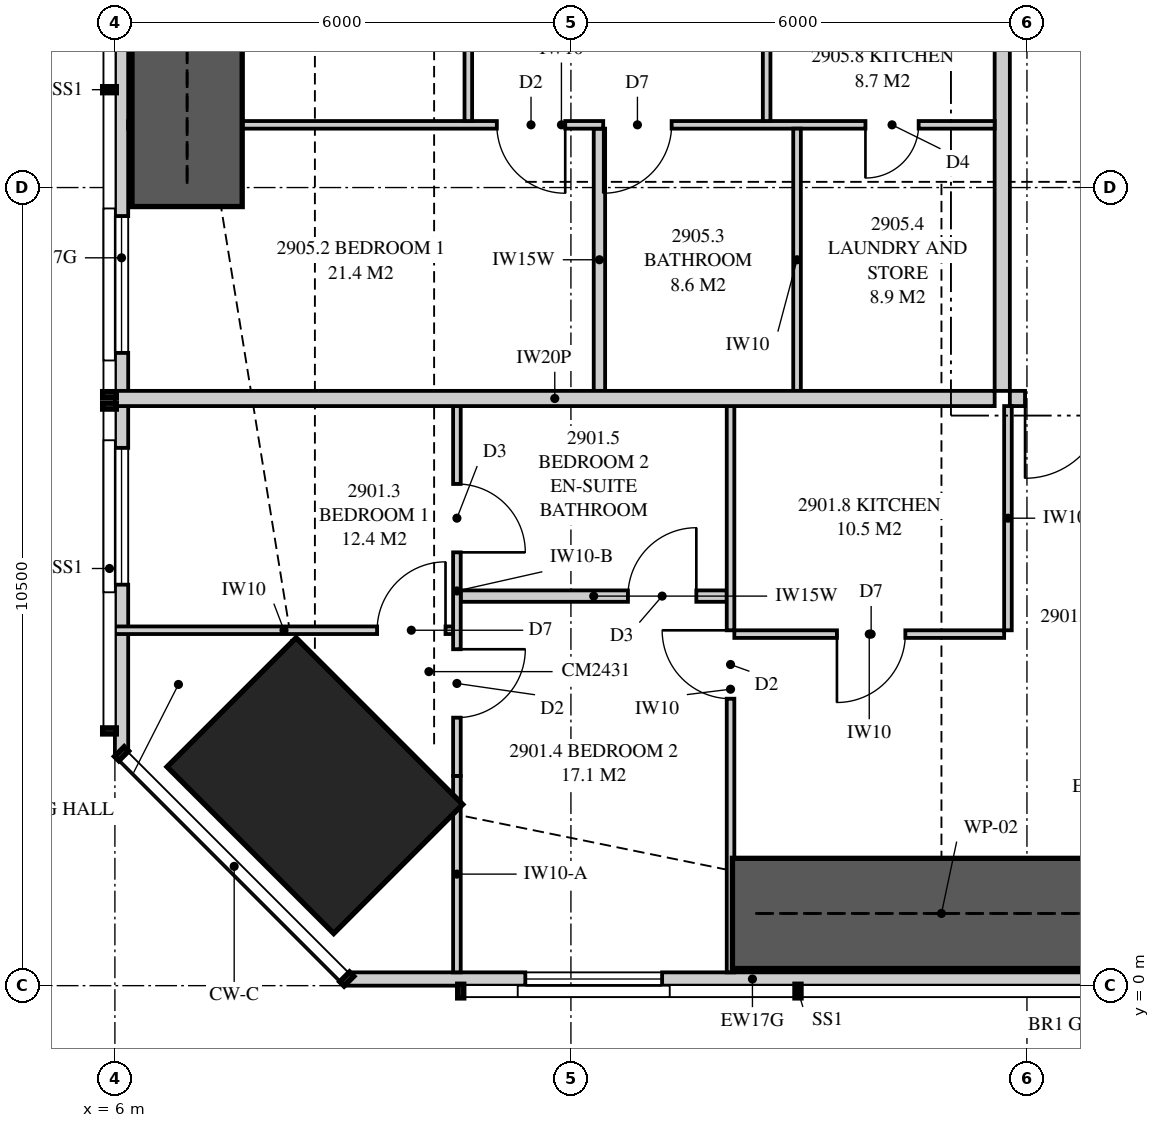
"""IFC4 building model, lengths in metres.
Left out: names, types, materials, properties, quantities, classifications, styles, units other than length and angle.
Written with IfcOpenShell. Run it as: python <this file> out.ifc"""

import sys

from ifc_helpers import new_model, si_unit, direction, frame, frame_2d, origin, origin_2d, place, context, subcontext, project, spatial, polyline, rectangle, outline, extrude, element, fill, save


model = new_model("IFC4")
c1 = context("Model", 3, precision=1e-05, world=origin(), true_north=direction((0.0, 1.0)))
c2 = subcontext(c1, "Body", "Model", "MODEL_VIEW")
j1 = project(units=[si_unit("LENGTHUNIT", "METRE"), si_unit("PLANEANGLEUNIT", "RADIAN")], contexts=[c1])
p1 = place(None, origin())
s1 = spatial("IfcSite", under=j1, at=p1, CompositionType="ELEMENT")
p2 = place(p1, origin())
s2 = spatial("IfcBuilding", under=s1, at=p2, CompositionType="ELEMENT")
p3 = place(p2, frame((0.0, 0.0, 108.2)))
s3 = spatial("IfcBuildingStorey", under=s2, at=p3, CompositionType="ELEMENT", Elevation=108.2)
p4 = place(p3, frame((8.631, 2.631, 0.0), z_axis=(0.0, 0.0, 1.0), x_axis=(0.707106781187, 0.707106781187, 0.0)))
e1 = element("IfcColumn", 1, at=p4, inside=s3, PredefinedType="COLUMN", context=c2, shape_type="SweptSolid", body=[
    extrude(rectangle(XDim=2.4, YDim=3.1, at=origin_2d()), origin(), (0.0, 0.0, 1.0), 3.35),
])
p5 = place(p3, frame((9.051, 0.087, 0.0), z_axis=(0.0, 0.0, 1.0), x_axis=(1.0, 0.0, 0.0)))
e2 = element("IfcWall", 2, at=p5, inside=s3, PredefinedType="SOLIDWALL", context=c2, shape_type="SweptSolid", body=[
    extrude(outline(polyline([(0.0, 0.0), (10.674, 0.0), (10.674, 2.15), (7.824, 2.15), (7.824, 3.11), (7.666, 3.11), (7.666, 2.15), (7.62, 2.15), (7.62, 3.11), (0.0, 3.11), (0.0, 0.0)])), frame((0.0, 0.087, 0.0), z_axis=(0.0, -1.0, 0.0), x_axis=(1.0, 0.0, 0.0)), (0.0, 0.0, 1.0), 0.175),
])
p6 = place(p5, frame((2.349, 0.0, 0.4)))
e3 = element("IfcOpeningElement", 3, at=p6, cuts=e2, PredefinedType="OPENING", context=c2, shape_type="SweptSolid", body=[
    extrude(rectangle(XDim=1.8, YDim=1.7, at=frame_2d((0.9, 0.85))), frame((0.0, 0.097, 0.0), z_axis=(0.0, -1.0, 0.0), x_axis=(1.0, 0.0, 0.0)), (0.0, 0.0, 1.0), 0.195),
])
p7 = place(p3, frame((6.087, 16.1, 0.0), z_axis=(0.0, 0.0, 1.0), x_axis=(0.0, -1.0, 0.0)))
e4 = element("IfcWall", 4, at=p7, inside=s3, PredefinedType="SOLIDWALL", context=c2, shape_type="SweptSolid", body=[
    extrude(outline(polyline([(0.0, 0.0), (13.049, 0.0), (13.049, 3.11), (3.319, 3.11), (3.319, 2.15), (3.226, 2.15), (3.226, 3.11), (3.1, 3.11), (3.1, 2.15), (0.0, 2.15), (0.0, 0.0)])), frame((0.0, 0.087, 0.0), z_axis=(0.0, -1.0, 0.0), x_axis=(1.0, 0.0, 0.0)), (0.0, 0.0, 1.0), 0.175),
])
p8 = place(p7, frame((5.975, 0.0, 0.4)))
e5 = element("IfcOpeningElement", 5, at=p8, cuts=e4, PredefinedType="OPENING", context=c2, shape_type="SweptSolid", body=[
    extrude(rectangle(XDim=1.8, YDim=1.7, at=frame_2d((0.9, 0.85))), frame((0.0, 0.097, 0.0), z_axis=(0.0, -1.0, 0.0), x_axis=(1.0, 0.0, 0.0)), (0.0, 0.0, 1.0), 0.195),
])
p9 = place(p7, frame((9.025, 0.0, 0.4)))
e6 = element("IfcOpeningElement", 6, at=p9, cuts=e4, PredefinedType="OPENING", context=c2, shape_type="SweptSolid", body=[
    extrude(rectangle(XDim=1.8, YDim=1.7, at=frame_2d((0.9, 0.85))), frame((0.0, 0.097, 0.0), z_axis=(0.0, -1.0, 0.0), x_axis=(1.0, 0.0, 0.0)), (0.0, 0.0, 1.0), 0.195),
])
p10 = place(p3, frame((17.775, 7.725, 0.0), z_axis=(0.0, 0.0, 1.0), x_axis=(1.0, 0.0, 0.0)))
e7 = element("IfcWall", 7, at=p10, inside=s3, PredefinedType="PARTITIONING", context=c2, shape_type="SweptSolid", body=[
    extrude(rectangle(XDim=8.225, YDim=0.2, at=frame_2d((4.113, 0.0))), origin(), (0.0, 0.0, 1.0), 3.11),
])
p11 = place(p10, frame((0.2, 0.0, 0.0)))
e8 = element("IfcOpeningElement", 8, at=p11, cuts=e7, PredefinedType="OPENING", context=c2, shape_type="SweptSolid", body=[
    extrude(rectangle(XDim=1.05, YDim=2.2, at=frame_2d((0.525, 1.1))), frame((0.0, 0.11, 0.0), z_axis=(0.0, -1.0, 0.0), x_axis=(1.0, 0.0, 0.0)), (0.0, 0.0, 1.0), 0.22),
])
p12 = place(p3, frame((10.5, 0.175, 0.0), z_axis=(0.0, 0.0, 1.0), x_axis=(0.0, 1.0, 0.0)))
e9 = element("IfcWall", 9, at=p12, inside=s3, PredefinedType="PARTITIONING", context=c2, shape_type="SweptSolid", body=[
    extrude(outline(polyline([(0.0, 0.0), (2.585, 0.0), (2.585, 2.15), (1.198, 2.15), (1.198, 3.11), (0.0, 3.11), (0.0, 0.0)])), frame((0.0, 0.05, 0.0), z_axis=(0.0, -1.0, 0.0), x_axis=(1.0, 0.0, 0.0)), (0.0, 0.0, 1.0), 0.1),
])
p13 = place(p3, frame((10.5, 2.76, 0.0), z_axis=(0.0, 0.0, 1.0), x_axis=(0.0, 1.0, 0.0)))
e10 = element("IfcWall", 10, at=p13, inside=s3, PredefinedType="PARTITIONING", context=c2, shape_type="SweptSolid", body=[
    extrude(outline(polyline([(0.0, 0.0), (4.865, 0.0), (4.865, 2.51), (0.368, 2.51), (0.368, 2.15), (0.0, 2.15), (0.0, 0.0)])), frame((0.0, 0.05, 0.0), z_axis=(0.0, -1.0, 0.0), x_axis=(1.0, 0.0, 0.0)), (0.0, 0.0, 1.0), 0.1),
])
p14 = place(p13, frame((0.766, 0.0, 0.0)))
e11 = element("IfcOpeningElement", 11, at=p14, cuts=e10, PredefinedType="OPENING", context=c2, shape_type="SweptSolid", body=[
    extrude(rectangle(XDim=0.9, YDim=2.1, at=frame_2d((0.45, 1.05))), frame((0.0, 0.06, 0.0), z_axis=(0.0, -1.0, 0.0), x_axis=(1.0, 0.0, 0.0)), (0.0, 0.0, 1.0), 0.12),
])
p15 = place(p13, frame((2.941, 0.0, 0.0)))
e12 = element("IfcOpeningElement", 12, at=p15, cuts=e10, PredefinedType="OPENING", context=c2, shape_type="SweptSolid", body=[
    extrude(rectangle(XDim=0.9, YDim=2.1, at=frame_2d((0.45, 1.05))), frame((0.0, 0.06, 0.0), z_axis=(0.0, -1.0, 0.0), x_axis=(1.0, 0.0, 0.0)), (0.0, 0.0, 1.0), 0.12),
])
p16 = place(p3, frame((14.1, 0.175, 0.0), z_axis=(0.0, 0.0, 1.0), x_axis=(0.0, 1.0, 0.0)))
e13 = element("IfcWall", 13, at=p16, inside=s3, PredefinedType="PARTITIONING", context=c2, shape_type="SweptSolid", body=[
    extrude(outline(polyline([(0.0, 0.0), (7.45, 0.0), (7.45, 3.11), (2.219, 3.11), (2.219, 2.15), (0.463, 2.15), (0.463, 3.11), (0.0, 3.11), (0.0, 0.0)])), frame((0.0, 0.05, 0.0), z_axis=(0.0, -1.0, 0.0), x_axis=(1.0, 0.0, 0.0)), (0.0, 0.0, 1.0), 0.1),
])
p17 = place(p16, frame((3.6, 0.0, 0.0)))
e14 = element("IfcOpeningElement", 14, at=p17, cuts=e13, PredefinedType="OPENING", context=c2, shape_type="SweptSolid", body=[
    extrude(rectangle(XDim=0.9, YDim=2.1, at=frame_2d((0.45, 1.05))), frame((0.0, 0.06, 0.0), z_axis=(0.0, -1.0, 0.0), x_axis=(1.0, 0.0, 0.0)), (0.0, 0.0, 1.0), 0.12),
])
p18 = place(p3, frame((6.0, 4.676, 0.0), z_axis=(0.0, 0.0, 1.0), x_axis=(1.0, 0.0, 0.0)))
e15 = element("IfcWall", 15, at=p18, inside=s3, PredefinedType="PARTITIONING", context=c2, shape_type="SweptSolid", body=[
    extrude(outline(polyline([(0.0, 0.0), (4.45, 0.0), (4.45, 3.11), (4.45, 2.51), (3.171, 2.51), (3.171, 2.15), (1.429, 2.15), (1.429, 3.11), (0.0, 3.11), (0.0, 0.0)])), frame((0.0, 0.05, 0.0), z_axis=(0.0, -1.0, 0.0), x_axis=(1.0, 0.0, 0.0)), (0.0, 0.0, 1.0), 0.1),
])
p19 = place(p18, frame((3.45, 0.0, 0.0)))
e16 = element("IfcOpeningElement", 16, at=p19, cuts=e15, PredefinedType="OPENING", context=c2, shape_type="SweptSolid", body=[
    extrude(rectangle(XDim=0.9, YDim=2.1, at=frame_2d((0.45, 1.05))), frame((0.0, 0.06, 0.0), z_axis=(0.0, -1.0, 0.0), x_axis=(1.0, 0.0, 0.0)), (0.0, 0.0, 1.0), 0.12),
])
p20 = place(p3, frame((10.55, 5.125, 0.0), z_axis=(0.0, 0.0, 1.0), x_axis=(1.0, 0.0, 0.0)))
e17 = element("IfcWall", 17, at=p20, inside=s3, PredefinedType="PLUMBINGWALL", context=c2, shape_type="SweptSolid", body=[
    extrude(outline(polyline([(0.0, 0.0), (3.5, 0.0), (3.5, 3.11), (0.935, 3.11), (0.935, 2.51), (0.0, 2.51), (0.0, 3.11), (0.0, 0.0)])), frame((0.0, 0.075, 0.0), z_axis=(0.0, -1.0, 0.0), x_axis=(1.0, 0.0, 0.0)), (0.0, 0.0, 1.0), 0.15),
])
p21 = place(p20, frame((2.2, 0.0, 0.0)))
e18 = element("IfcOpeningElement", 18, at=p21, cuts=e17, PredefinedType="OPENING", context=c2, shape_type="SweptSolid", body=[
    extrude(rectangle(XDim=0.9, YDim=2.1, at=frame_2d((0.45, 1.05))), frame((0.0, 0.085, 0.0), z_axis=(0.0, -1.0, 0.0), x_axis=(1.0, 0.0, 0.0)), (0.0, 0.0, 1.0), 0.17),
])
p22 = place(p3, frame((14.15, 4.625, 0.0), z_axis=(0.0, 0.0, 1.0), x_axis=(1.0, 0.0, 0.0)))
e19 = element("IfcWall", 19, at=p22, inside=s3, PredefinedType="PARTITIONING", context=c2, shape_type="SweptSolid", body=[
    extrude(outline(polyline([(0.0, 0.0), (3.55, 0.0), (3.55, 3.11), (3.012, 3.11), (3.012, 2.541), (2.438, 2.541), (2.438, 3.11), (0.0, 3.11), (0.0, 0.0)])), frame((0.0, 0.05, 0.0), z_axis=(0.0, -1.0, 0.0), x_axis=(1.0, 0.0, 0.0)), (0.0, 0.0, 1.0), 0.1),
])
p23 = place(p22, frame((1.35, 0.0, 0.0)))
e20 = element("IfcOpeningElement", 20, at=p23, cuts=e19, PredefinedType="OPENING", context=c2, shape_type="SweptSolid", body=[
    extrude(rectangle(XDim=0.9, YDim=2.1, at=frame_2d((0.45, 1.05))), frame((0.0, 0.06, 0.0), z_axis=(0.0, -1.0, 0.0), x_axis=(1.0, 0.0, 0.0)), (0.0, 0.0, 1.0), 0.12),
])
p24 = place(p3, frame((17.75, 4.675, 0.0), z_axis=(0.0, 0.0, 1.0), x_axis=(0.0, 1.0, 0.0)))
e21 = element("IfcWall", 21, at=p24, inside=s3, PredefinedType="PARTITIONING", context=c2, shape_type="SweptSolid", body=[
    extrude(rectangle(XDim=2.95, YDim=0.1, at=frame_2d((1.475, 0.0))), origin(), (0.0, 0.0, 1.0), 3.11),
])
p25 = place(p3, frame((6.0, 7.725, 0.0), z_axis=(0.0, 0.0, 1.0), x_axis=(1.0, 0.0, 0.0)))
e22 = element("IfcWall", 22, at=p25, inside=s3, PredefinedType="PARTITIONING", context=c2, shape_type="SweptSolid", body=[
    extrude(outline(polyline([(0.0, 0.0), (11.575, 0.0), (11.575, 3.11), (11.212, 3.11), (11.212, 2.541), (10.538, 2.541), (10.538, 3.11), (5.51, 3.11), (5.51, 2.51), (2.969, 2.51), (2.969, 2.541), (2.727, 2.541), (2.727, 2.15), (0.884, 2.15), (0.884, 3.11), (0.0, 3.11), (0.0, 0.0)])), frame((0.0, 0.1, 0.0), z_axis=(0.0, -1.0, 0.0), x_axis=(1.0, 0.0, 0.0)), (0.0, 0.0, 1.0), 0.2),
])
p26 = place(p3, frame((17.675, 7.825, 0.0), z_axis=(0.0, 0.0, 1.0), x_axis=(0.0, 1.0, 0.0)))
e23 = element("IfcWall", 23, at=p26, inside=s3, PredefinedType="PARTITIONING", context=c2, shape_type="SweptSolid", body=[
    extrude(outline(polyline([(0.0, 0.0), (6.637, 0.0), (6.637, 3.11), (3.087, 3.11), (3.087, 2.541), (2.413, 2.541), (2.413, 3.11), (0.0, 3.11), (0.0, 0.0)])), frame((0.0, 0.1, 0.0), z_axis=(0.0, -1.0, 0.0), x_axis=(1.0, 0.0, 0.0)), (0.0, 0.0, 1.0), 0.2),
])
p27 = place(p3, frame((6.175, 11.325, 0.0), z_axis=(0.0, 0.0, 1.0), x_axis=(1.0, 0.0, 0.0)))
e24 = element("IfcWall", 24, at=p27, inside=s3, PredefinedType="PARTITIONING", context=c2, shape_type="SweptSolid", body=[
    extrude(outline(polyline([(0.175, 3.11), (0.0, 3.11), (0.0, 0.0), (0.529, 0.0), (0.529, 0.325), (1.021, 0.325), (1.021, 0.0), (11.4, 0.0), (11.4, 3.11), (5.285, 3.11), (5.285, 2.51), (2.765, 2.51), (2.765, 3.11), (2.744, 3.11), (2.744, 2.541), (2.169, 2.541), (2.169, 3.11), (1.918, 3.11), (1.918, 2.15), (1.021, 2.15), (1.021, 1.825), (0.529, 1.825), (0.529, 2.15), (0.175, 2.15), (0.175, 3.11)])), frame((0.0, 0.05, 0.0), z_axis=(0.0, -1.0, 0.0), x_axis=(1.0, 0.0, 0.0)), (0.0, 0.0, 1.0), 0.1),
])
p28 = place(p27, frame((4.85, 0.0, 0.0)))
e25 = element("IfcOpeningElement", 25, at=p28, cuts=e24, PredefinedType="OPENING", context=c2, shape_type="SweptSolid", body=[
    extrude(rectangle(XDim=0.9, YDim=2.1, at=frame_2d((0.45, 1.05))), frame((0.0, 0.06, 0.0), z_axis=(0.0, -1.0, 0.0), x_axis=(1.0, 0.0, 0.0)), (0.0, 0.0, 1.0), 0.12),
])
p29 = place(p27, frame((6.25, 0.0, 0.0)))
e26 = element("IfcOpeningElement", 26, at=p29, cuts=e24, PredefinedType="OPENING", context=c2, shape_type="SweptSolid", body=[
    extrude(rectangle(XDim=0.9, YDim=2.1, at=frame_2d((0.45, 1.05))), frame((0.0, 0.06, 0.0), z_axis=(0.0, -1.0, 0.0), x_axis=(1.0, 0.0, 0.0)), (0.0, 0.0, 1.0), 0.12),
])
p30 = place(p27, frame((9.7, 0.0, 0.0)))
e27 = element("IfcOpeningElement", 27, at=p30, cuts=e24, PredefinedType="OPENING", context=c2, shape_type="SweptSolid", body=[
    extrude(rectangle(XDim=0.7, YDim=2.1, at=frame_2d((0.35, 1.05))), frame((0.0, 0.06, 0.0), z_axis=(0.0, -1.0, 0.0), x_axis=(1.0, 0.0, 0.0)), (0.0, 0.0, 1.0), 0.12),
])
p31 = place(p3, frame((12.375, 7.825, 0.0), z_axis=(0.0, 0.0, 1.0), x_axis=(0.0, 1.0, 0.0)))
e28 = element("IfcWall", 28, at=p31, inside=s3, PredefinedType="PLUMBINGWALL", context=c2, shape_type="SweptSolid", body=[
    extrude(outline(polyline([(0.0, 0.0), (3.45, 0.0), (3.45, 3.11), (3.062, 3.11), (3.062, 2.541), (2.438, 2.541), (2.438, 3.11), (0.0, 3.11), (0.0, 0.0)])), frame((0.0, 0.075, 0.0), z_axis=(0.0, -1.0, 0.0), x_axis=(1.0, 0.0, 0.0)), (0.0, 0.0, 1.0), 0.15),
])
p32 = place(p3, frame((14.975, 7.825, 0.0), z_axis=(0.0, 0.0, 1.0), x_axis=(0.0, 1.0, 0.0)))
e29 = element("IfcWall", 29, at=p32, inside=s3, PredefinedType="PARTITIONING", context=c2, shape_type="SweptSolid", body=[
    extrude(outline(polyline([(0.0, 0.0), (3.45, 0.0), (3.45, 3.11), (3.037, 3.11), (3.037, 2.541), (2.463, 2.541), (2.463, 3.11), (0.0, 3.11), (0.0, 0.0)])), frame((0.0, 0.05, 0.0), z_axis=(0.0, -1.0, 0.0), x_axis=(1.0, 0.0, 0.0)), (0.0, 0.0, 1.0), 0.1),
])
p33 = place(p3, frame((14.575, 11.375, 0.0), z_axis=(0.0, 0.0, 1.0), x_axis=(0.0, 1.0, 0.0)))
e30 = element("IfcWall", 30, at=p33, inside=s3, PredefinedType="PARTITIONING", context=c2, shape_type="SweptSolid", body=[
    extrude(rectangle(XDim=2.95, YDim=0.1, at=frame_2d((1.475, 0.0))), origin(), (0.0, 0.0, 1.0), 3.11),
])
p34 = place(p33, frame((1.05, 0.0, 0.0)))
e31 = element("IfcOpeningElement", 31, at=p34, cuts=e30, PredefinedType="OPENING", context=c2, shape_type="SweptSolid", body=[
    extrude(rectangle(XDim=0.9, YDim=2.1, at=frame_2d((0.45, 1.05))), frame((0.0, 0.06, 0.0), z_axis=(0.0, -1.0, 0.0), x_axis=(1.0, 0.0, 0.0)), (0.0, 0.0, 1.0), 0.12),
])
p35 = place(p3, frame((10.65, 11.375, 0.0), z_axis=(0.0, 0.0, 1.0), x_axis=(0.0, 1.0, 0.0)))
e32 = element("IfcWall", 32, at=p35, inside=s3, PredefinedType="PARTITIONING", context=c2, shape_type="SweptSolid", body=[
    extrude(outline(polyline([(0.0, 0.0), (7.775, 0.0), (7.775, 3.11), (7.775, 2.51), (1.685, 2.51), (0.0, 2.51), (0.0, 3.11), (0.0, 0.0)])), frame((0.0, 0.05, 0.0), z_axis=(0.0, -1.0, 0.0), x_axis=(1.0, 0.0, 0.0)), (0.0, 0.0, 1.0), 0.1),
])
p36 = place(p35, frame((3.387, 0.0, 0.0)))
e33 = element("IfcOpeningElement", 33, at=p36, cuts=e32, PredefinedType="OPENING", context=c2, shape_type="SweptSolid", body=[
    extrude(rectangle(XDim=1.0, YDim=2.1, at=frame_2d((0.5, 1.05))), frame((0.0, 0.06, 0.0), z_axis=(0.0, -1.0, 0.0), x_axis=(1.0, 0.0, 0.0)), (0.0, 0.0, 1.0), 0.12),
])
for number, where, z_axis, x_axis in (
    (34, (14.125, 0.95, 0.0), (0.0, 0.0, 1.0), (1.0, 0.0, 0.0)),
    (35, (6.95, 10.25, 0.0), (0.0, 0.0, 1.0), (0.0, 1.0, 0.0)),
):
    element("IfcWall", number, at=place(p3, frame(where, z_axis=z_axis, x_axis=x_axis)), inside=s3, PredefinedType="SHEAR", context=c2, shape_type="SweptSolid", body=[
        extrude(rectangle(XDim=5.5, YDim=1.45, at=frame_2d((2.75, 0.0))), origin(), (0.0, 0.0, 1.0), 3.35),
    ])
p37 = place(p6, origin())
e36 = element("IfcWindow", 36, at=p37, inside=s3, PartitioningType="SINGLE_PANEL", PredefinedType="WINDOW", context=c2, shape_type="SweptSolid", body=[
    extrude(rectangle(XDim=1.8, YDim=1.7, at=frame_2d((0.9, 0.85))), frame((0.0, 0.03, 0.0), z_axis=(0.0, -1.0, 0.0), x_axis=(1.0, 0.0, 0.0)), (0.0, 0.0, 1.0), 0.06),
])
fill(e3, e36)
p38 = place(p8, origin())
e37 = element("IfcWindow", 37, at=p38, inside=s3, PartitioningType="SINGLE_PANEL", PredefinedType="WINDOW", context=c2, shape_type="SweptSolid", body=[
    extrude(rectangle(XDim=1.8, YDim=1.7, at=frame_2d((0.9, 0.85))), frame((0.0, 0.03, 0.0), z_axis=(0.0, -1.0, 0.0), x_axis=(1.0, 0.0, 0.0)), (0.0, 0.0, 1.0), 0.06),
])
fill(e5, e37)
p39 = place(p9, origin())
e38 = element("IfcWindow", 38, at=p39, inside=s3, PartitioningType="SINGLE_PANEL", PredefinedType="WINDOW", context=c2, shape_type="SweptSolid", body=[
    extrude(rectangle(XDim=1.8, YDim=1.7, at=frame_2d((0.9, 0.85))), frame((0.0, 0.03, 0.0), z_axis=(0.0, -1.0, 0.0), x_axis=(1.0, 0.0, 0.0)), (0.0, 0.0, 1.0), 0.06),
])
fill(e6, e38)
p40 = place(p11, frame((1.05, 0.0, 0.0), z_axis=(0.0, 0.0, 1.0), x_axis=(-1.0, 0.0, 0.0)))
e39 = element("IfcDoor", 39, at=p40, inside=s3, OperationType="SINGLE_SWING_RIGHT", PredefinedType="DOOR", context=c2, shape_type="SweptSolid", body=[
    extrude(rectangle(XDim=1.05, YDim=2.2, at=frame_2d((0.525, 1.1))), frame((0.0, 0.025, 0.0), z_axis=(0.0, -1.0, 0.0), x_axis=(1.0, 0.0, 0.0)), (0.0, 0.0, 1.0), 0.05),
])
fill(e8, e39)
p41 = place(p19, origin())
e40 = element("IfcDoor", 40, at=p41, inside=s3, OperationType="SINGLE_SWING_RIGHT", PredefinedType="DOOR", context=c2, shape_type="SweptSolid", body=[
    extrude(rectangle(XDim=0.9, YDim=2.1, at=frame_2d((0.45, 1.05))), frame((0.0, 0.025, 0.0), z_axis=(0.0, -1.0, 0.0), x_axis=(1.0, 0.0, 0.0)), (0.0, 0.0, 1.0), 0.05),
])
fill(e16, e40)
p42 = place(p14, frame((0.9, 0.0, 0.0), z_axis=(0.0, 0.0, 1.0), x_axis=(-1.0, 0.0, 0.0)))
e41 = element("IfcDoor", 41, at=p42, inside=s3, OperationType="SINGLE_SWING_LEFT", PredefinedType="DOOR", context=c2, shape_type="SweptSolid", body=[
    extrude(rectangle(XDim=0.9, YDim=2.1, at=frame_2d((0.45, 1.05))), frame((0.0, 0.025, 0.0), z_axis=(0.0, -1.0, 0.0), x_axis=(1.0, 0.0, 0.0)), (0.0, 0.0, 1.0), 0.05),
])
fill(e11, e41)
p43 = place(p17, origin())
e42 = element("IfcDoor", 42, at=p43, inside=s3, OperationType="SINGLE_SWING_RIGHT", PredefinedType="DOOR", context=c2, shape_type="SweptSolid", body=[
    extrude(rectangle(XDim=0.9, YDim=2.1, at=frame_2d((0.45, 1.05))), frame((0.0, 0.025, 0.0), z_axis=(0.0, -1.0, 0.0), x_axis=(1.0, 0.0, 0.0)), (0.0, 0.0, 1.0), 0.05),
])
fill(e14, e42)
p44 = place(p21, origin())
e43 = element("IfcDoor", 43, at=p44, inside=s3, OperationType="SINGLE_SWING_RIGHT", PredefinedType="DOOR", context=c2, shape_type="SweptSolid", body=[
    extrude(rectangle(XDim=0.9, YDim=2.1, at=frame_2d((0.45, 1.05))), frame((0.0, 0.025, 0.0), z_axis=(0.0, -1.0, 0.0), x_axis=(1.0, 0.0, 0.0)), (0.0, 0.0, 1.0), 0.05),
])
fill(e18, e43)
p45 = place(p15, frame((0.9, 0.0, 0.0), z_axis=(0.0, 0.0, 1.0), x_axis=(-1.0, 0.0, 0.0)))
e44 = element("IfcDoor", 44, at=p45, inside=s3, OperationType="SINGLE_SWING_RIGHT", PredefinedType="DOOR", context=c2, shape_type="SweptSolid", body=[
    extrude(rectangle(XDim=0.9, YDim=2.1, at=frame_2d((0.45, 1.05))), frame((0.0, 0.025, 0.0), z_axis=(0.0, -1.0, 0.0), x_axis=(1.0, 0.0, 0.0)), (0.0, 0.0, 1.0), 0.05),
])
fill(e12, e44)
p46 = place(p23, frame((0.9, 0.0, 0.0), z_axis=(0.0, 0.0, 1.0), x_axis=(-1.0, 0.0, 0.0)))
e45 = element("IfcDoor", 45, at=p46, inside=s3, OperationType="SINGLE_SWING_RIGHT", PredefinedType="DOOR", context=c2, shape_type="SweptSolid", body=[
    extrude(rectangle(XDim=0.9, YDim=2.1, at=frame_2d((0.45, 1.05))), frame((0.0, 0.025, 0.0), z_axis=(0.0, -1.0, 0.0), x_axis=(1.0, 0.0, 0.0)), (0.0, 0.0, 1.0), 0.05),
])
fill(e20, e45)
p47 = place(p28, frame((0.9, 0.0, 0.0), z_axis=(0.0, 0.0, 1.0), x_axis=(-1.0, 0.0, 0.0)))
e46 = element("IfcDoor", 46, at=p47, inside=s3, OperationType="SINGLE_SWING_LEFT", PredefinedType="DOOR", context=c2, shape_type="SweptSolid", body=[
    extrude(rectangle(XDim=0.9, YDim=2.1, at=frame_2d((0.45, 1.05))), frame((0.0, 0.025, 0.0), z_axis=(0.0, -1.0, 0.0), x_axis=(1.0, 0.0, 0.0)), (0.0, 0.0, 1.0), 0.05),
])
fill(e25, e46)
p48 = place(p29, frame((0.9, 0.0, 0.0), z_axis=(0.0, 0.0, 1.0), x_axis=(-1.0, 0.0, 0.0)))
e47 = element("IfcDoor", 47, at=p48, inside=s3, OperationType="SINGLE_SWING_RIGHT", PredefinedType="DOOR", context=c2, shape_type="SweptSolid", body=[
    extrude(rectangle(XDim=0.9, YDim=2.1, at=frame_2d((0.45, 1.05))), frame((0.0, 0.025, 0.0), z_axis=(0.0, -1.0, 0.0), x_axis=(1.0, 0.0, 0.0)), (0.0, 0.0, 1.0), 0.05),
])
fill(e26, e47)
p49 = place(p30, frame((0.7, 0.0, 0.0), z_axis=(0.0, 0.0, 1.0), x_axis=(-1.0, 0.0, 0.0)))
e48 = element("IfcDoor", 48, at=p49, inside=s3, OperationType="SINGLE_SWING_RIGHT", PredefinedType="DOOR", context=c2, shape_type="SweptSolid", body=[
    extrude(rectangle(XDim=0.7, YDim=2.1, at=frame_2d((0.35, 1.05))), frame((0.0, 0.025, 0.0), z_axis=(0.0, -1.0, 0.0), x_axis=(1.0, 0.0, 0.0)), (0.0, 0.0, 1.0), 0.05),
])
fill(e27, e48)
save(model, sys.argv[1])
